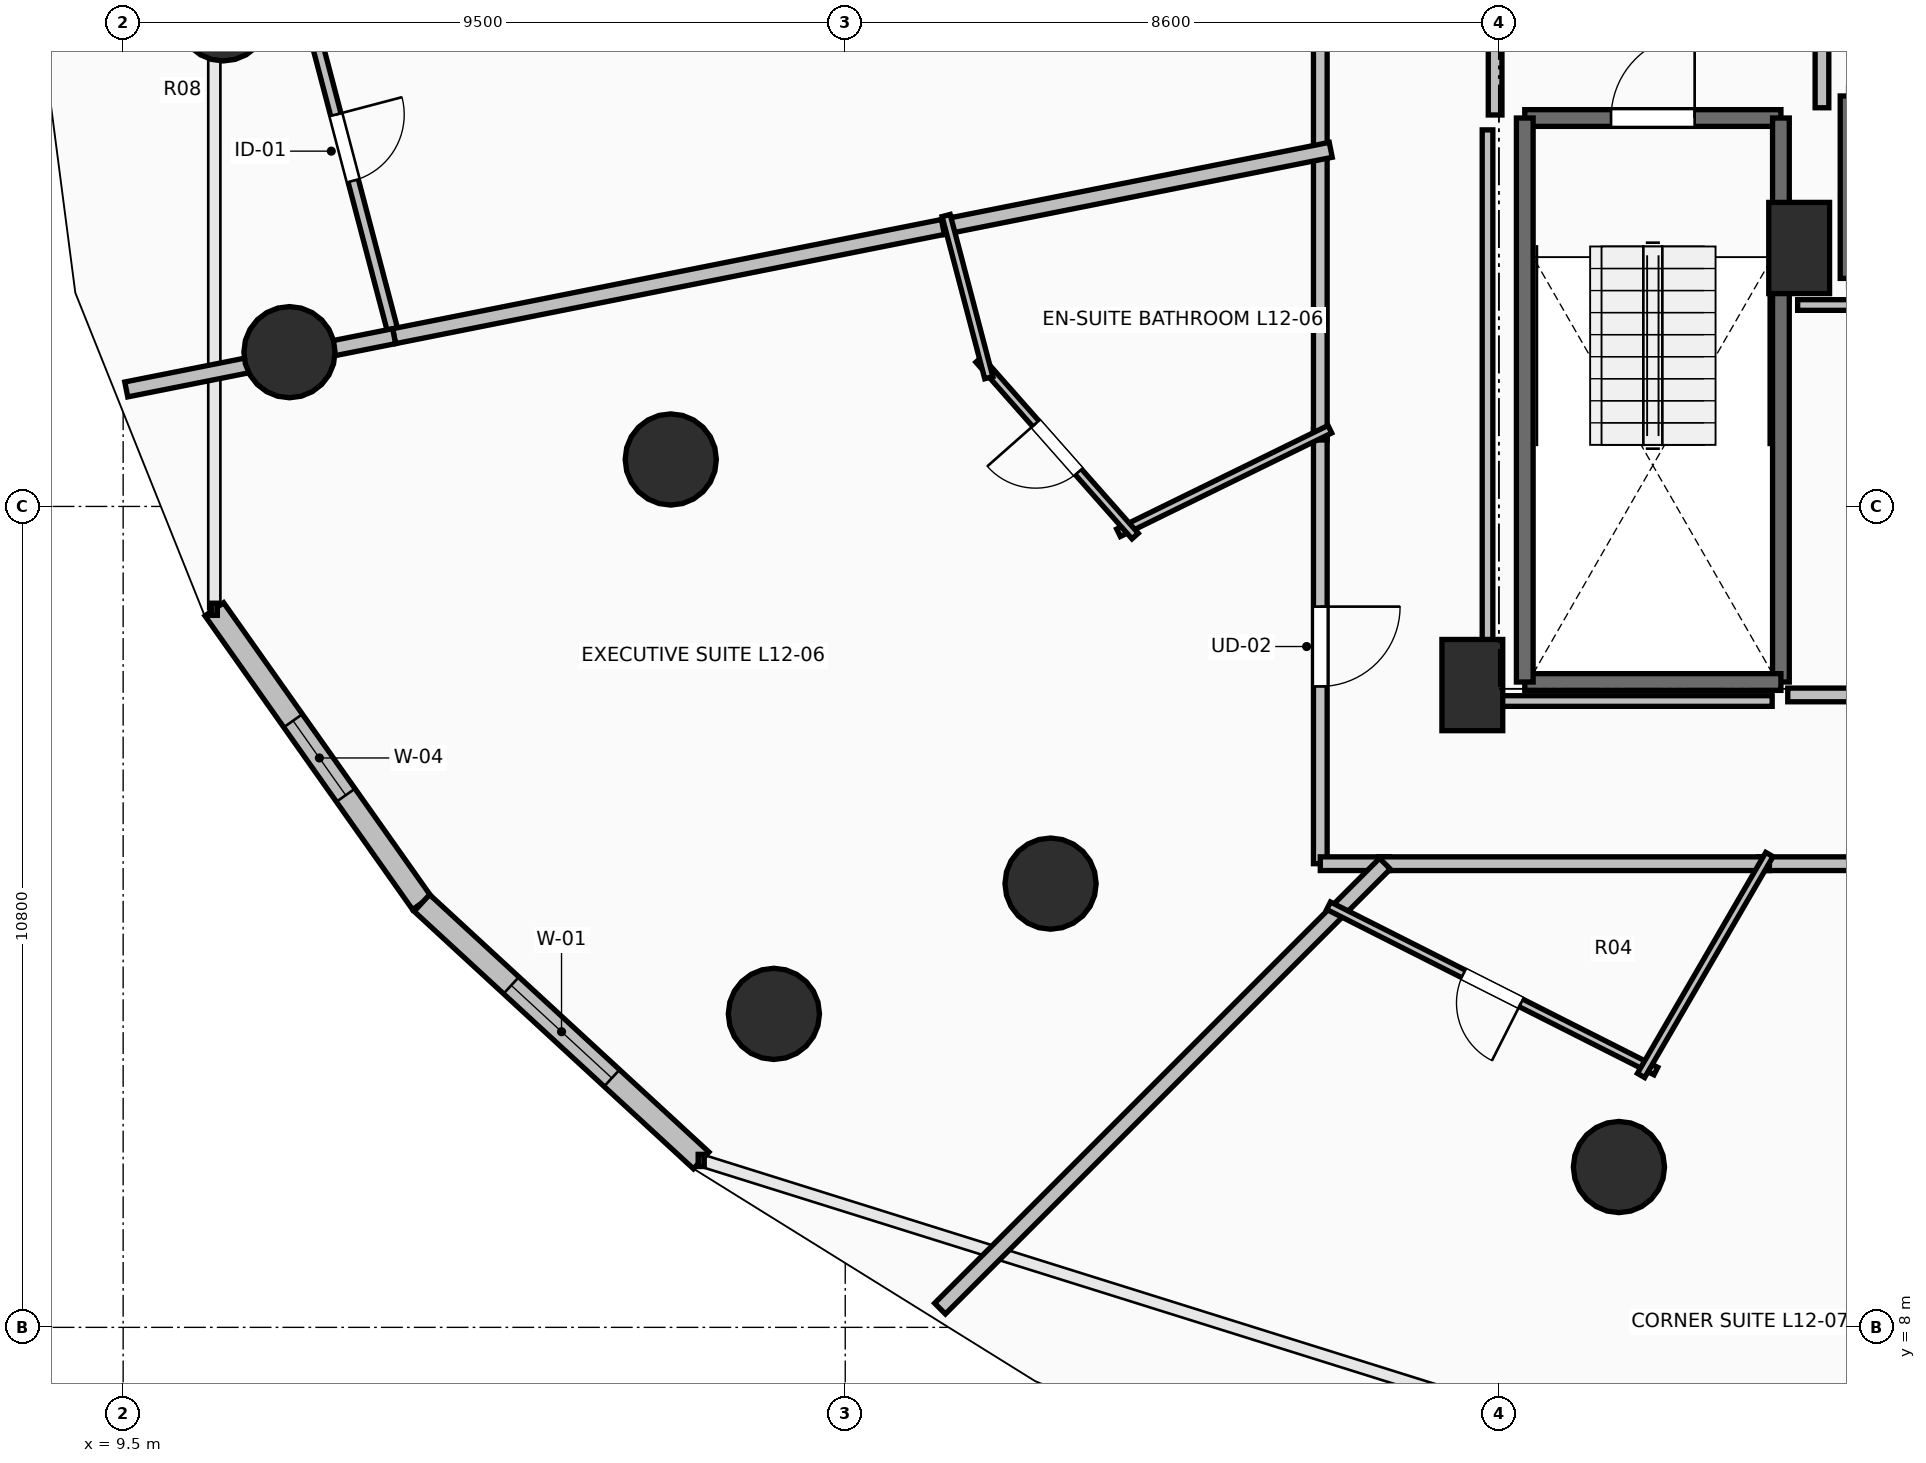
"""IFC4 building model, lengths in metres.
Left out: names, types, materials, properties, quantities, classifications, styles, units other than length and angle.
Written with IfcOpenShell. Run it as: python <this file> out.ifc"""

import sys

from ifc_helpers import new_model, si_unit, direction, frame, frame_2d, origin, origin_2d, place, context, subcontext, project, spatial, rectangle, circle, extrude, element, fill, save


model = new_model("IFC4")
c1 = context("Model", 3, precision=1e-05, world=origin(), true_north=direction((0.0, 1.0)))
c2 = subcontext(c1, "Body", "Model", "MODEL_VIEW")
j1 = project(units=[si_unit("LENGTHUNIT", "METRE"), si_unit("PLANEANGLEUNIT", "RADIAN")], contexts=[c1])
p1 = place(None, origin())
s1 = spatial("IfcSite", under=j1, at=p1, CompositionType="ELEMENT")
p2 = place(p1, origin())
s2 = spatial("IfcBuilding", under=s1, at=p2, CompositionType="ELEMENT")
p3 = place(p2, frame((0.0, 0.0, 48.5)))
s3 = spatial("IfcBuildingStorey", under=s2, at=p3, CompositionType="ELEMENT", Elevation=48.5)
for number, where, z_axis, x_axis in (
    (1, (16.705, 19.418, 0.0), (0.0, 0.0, 1.0), (-0.924, -0.383, 0.0)),
    (2, (21.701, 13.838, 0.0), (0.0, 0.0, 1.0), (-0.707, -0.707, 0.0)),
    (3, (29.179, 10.109, 0.0), (0.0, 0.0, 1.0), (-0.383, -0.924, 0.0)),
    (4, (10.818, 25.261, 0.0), (0.0, 0.0, 1.0), (-1.0, 0.0, 0.0)),
    (5, (11.688, 20.83, 0.0), (0.0, 0.0, 1.0), (-0.924, -0.383, 0.0)),
    (6, (18.061, 12.124, 0.0), (0.0, 0.0, 1.0), (-0.707, -0.707, 0.0)),
):
    element("IfcColumn", number, at=place(p3, frame(where, z_axis=z_axis, x_axis=x_axis)), inside=s3, PredefinedType="COLUMN", context=c2, shape_type="SweptSolid", body=[
        extrude(circle(Radius=0.6, at=origin_2d()), origin(), (0.0, 0.0, 1.0), 3.5),
    ])
for number, where, z_axis, x_axis in (
    (7, (27.25, 16.45, 0.0), (0.0, 0.0, 1.0), (1.0, 0.0, 0.0)),
    (8, (31.55, 22.2, 0.0), (0.0, 0.0, 1.0), (1.0, 0.0, 0.0)),
):
    element("IfcColumn", number, at=place(p3, frame(where, z_axis=z_axis, x_axis=x_axis)), inside=s3, PredefinedType="PILASTER", context=c2, shape_type="SweptSolid", body=[
        extrude(rectangle(XDim=0.8, YDim=1.2, at=origin_2d()), origin(), (0.0, 0.0, 1.0), 3.5),
    ])
p4 = place(p3, frame((10.699, 17.447, 0.0), z_axis=(0.0, 0.0, 1.0), x_axis=(0.577130815624, -0.816651713803, 0.0)))
e9 = element("IfcWall", 9, at=p4, inside=s3, PredefinedType="STANDARD", context=c2, shape_type="SweptSolid", body=[
    extrude(rectangle(XDim=4.731, YDim=0.3, at=frame_2d((2.366, 0.0))), origin(), (0.0, 0.0, 1.0), 3.24),
])
p5 = place(p4, frame((1.795, 0.0, 0.85)))
e10 = element("IfcOpeningElement", 10, at=p5, cuts=e9, PredefinedType="OPENING", context=c2, shape_type="SweptSolid", body=[
    extrude(rectangle(XDim=1.2, YDim=1.95, at=frame_2d((0.6, 0.975))), frame((0.0, 0.165, 0.0), z_axis=(0.0, -1.0, 0.0), x_axis=(1.0, 0.0, 0.0)), (0.0, 0.0, 1.0), 0.33),
])
p6 = place(p3, frame((13.43, 13.583, 0.0), z_axis=(0.0, 0.0, 1.0), x_axis=(0.735342629635, -0.677695519419, 0.0)))
e11 = element("IfcWall", 11, at=p6, inside=s3, PredefinedType="STANDARD", context=c2, shape_type="SweptSolid", body=[
    extrude(rectangle(XDim=4.997, YDim=0.3, at=frame_2d((2.499, 0.0))), origin(), (0.0, 0.0, 1.0), 3.24),
])
p7 = place(p6, frame((1.599, 0.0, 0.85)))
e12 = element("IfcOpeningElement", 12, at=p7, cuts=e11, PredefinedType="OPENING", context=c2, shape_type="SweptSolid", body=[
    extrude(rectangle(XDim=1.8, YDim=2.19, at=frame_2d((0.9, 1.095))), frame((0.0, 0.165, 0.0), z_axis=(0.0, -1.0, 0.0), x_axis=(1.0, 0.0, 0.0)), (0.0, 0.0, 1.0), 0.33),
])
p8 = place(p3, frame((27.94, 23.91, 0.0), z_axis=(0.0, 0.0, 1.0), x_axis=(1.0, 0.0, 0.0)))
e13 = element("IfcWall", 13, at=p8, inside=s3, PredefinedType="SOLIDWALL", context=c2, shape_type="SweptSolid", body=[
    extrude(rectangle(XDim=3.37, YDim=0.22, at=frame_2d((1.685, 0.0))), origin(), (0.0, 0.0, 1.0), 3.24),
])
p9 = place(p8, frame((1.135, 0.0, 0.0)))
e14 = element("IfcOpeningElement", 14, at=p9, cuts=e13, PredefinedType="OPENING", context=c2, shape_type="SweptSolid", body=[
    extrude(rectangle(XDim=1.1, YDim=2.15, at=frame_2d((0.55, 1.075))), frame((0.0, 0.125, 0.0), z_axis=(0.0, -1.0, 0.0), x_axis=(1.0, 0.0, 0.0)), (0.0, 0.0, 1.0), 0.25),
])
p10 = place(p3, frame((31.31, 23.91, 0.0), z_axis=(0.0, 0.0, 1.0), x_axis=(0.0, -1.0, 0.0)))
e15 = element("IfcWall", 15, at=p10, inside=s3, PredefinedType="SOLIDWALL", context=c2, shape_type="SweptSolid", body=[
    extrude(rectangle(XDim=7.42, YDim=0.22, at=frame_2d((3.71, 0.0))), origin(), (0.0, 0.0, 1.0), 3.24),
])
p11 = place(p3, frame((31.31, 16.49, 0.0), z_axis=(0.0, 0.0, 1.0), x_axis=(-1.0, 0.0, 0.0)))
e16 = element("IfcWall", 16, at=p11, inside=s3, PredefinedType="SOLIDWALL", context=c2, shape_type="SweptSolid", body=[
    extrude(rectangle(XDim=3.37, YDim=0.22, at=frame_2d((1.685, 0.0))), origin(), (0.0, 0.0, 1.0), 3.24),
])
p12 = place(p3, frame((27.94, 16.49, 0.0), z_axis=(0.0, 0.0, 1.0), x_axis=(0.0, 1.0, 0.0)))
e17 = element("IfcWall", 17, at=p12, inside=s3, PredefinedType="SOLIDWALL", context=c2, shape_type="SweptSolid", body=[
    extrude(rectangle(XDim=7.42, YDim=0.22, at=frame_2d((3.71, 0.0))), origin(), (0.0, 0.0, 1.0), 3.24),
])
p13 = place(p3, frame((32.2, 24.2, 0.0), z_axis=(0.0, 0.0, 1.0), x_axis=(0.0, -1.0, 0.0)))
e18 = element("IfcWall", 18, at=p13, inside=s3, PredefinedType="SOLIDWALL", context=c2, shape_type="SweptSolid", body=[
    extrude(rectangle(XDim=2.4, YDim=0.22, at=frame_2d((1.2, 0.0))), origin(), (0.0, 0.0, 1.0), 3.24),
])
p14 = place(p3, frame((31.85, 24.045, 0.0), z_axis=(0.0, 0.0, 1.0), x_axis=(0.0, 1.0, 0.0)))
e19 = element("IfcWall", 19, at=p14, inside=s3, PredefinedType="PARTITIONING", context=c2, shape_type="SweptSolid", body=[
    extrude(rectangle(XDim=3.91, YDim=0.18, at=frame_2d((1.955, 0.0))), origin(), (0.0, 0.0, 1.0), 3.24),
])
p15 = place(p14, frame((1.355, 0.0, 0.0)))
e20 = element("IfcOpeningElement", 20, at=p15, cuts=e19, PredefinedType="OPENING", context=c2, shape_type="SweptSolid", body=[
    extrude(rectangle(XDim=1.2, YDim=2.15, at=frame_2d((0.6, 1.075))), frame((0.0, 0.105, 0.0), z_axis=(0.0, -1.0, 0.0), x_axis=(1.0, 0.0, 0.0)), (0.0, 0.0, 1.0), 0.21),
])
p16 = place(p3, frame((27.55, 28.0, 0.0), z_axis=(0.0, 0.0, 1.0), x_axis=(0.0, -1.0, 0.0)))
e21 = element("IfcWall", 21, at=p16, inside=s3, PredefinedType="PARTITIONING", context=c2, shape_type="SweptSolid", body=[
    extrude(rectangle(XDim=4.05, YDim=0.18, at=frame_2d((2.025, 0.0))), origin(), (0.0, 0.0, 1.0), 3.24),
])
p17 = place(p16, frame((1.425, 0.0, 0.0)))
e22 = element("IfcOpeningElement", 22, at=p17, cuts=e21, PredefinedType="OPENING", context=c2, shape_type="SweptSolid", body=[
    extrude(rectangle(XDim=1.2, YDim=2.15, at=frame_2d((0.6, 1.075))), frame((0.0, 0.105, 0.0), z_axis=(0.0, -1.0, 0.0), x_axis=(1.0, 0.0, 0.0)), (0.0, 0.0, 1.0), 0.21),
])
p18 = place(p3, frame((31.4, 16.32, 0.0), z_axis=(0.0, 0.0, 1.0), x_axis=(1.0, 0.0, 0.0)))
e23 = element("IfcWall", 23, at=p18, inside=s3, PredefinedType="PARTITIONING", context=c2, shape_type="SweptSolid", body=[
    extrude(rectangle(XDim=4.4, YDim=0.18, at=frame_2d((2.2, 0.0))), origin(), (0.0, 0.0, 1.0), 3.24),
])
p19 = place(p18, frame((1.775, 0.0, 0.0)))
e24 = element("IfcOpeningElement", 24, at=p19, cuts=e23, PredefinedType="OPENING", context=c2, shape_type="SweptSolid", body=[
    extrude(rectangle(XDim=0.85, YDim=2.1, at=frame_2d((0.425, 1.05))), frame((0.0, 0.105, 0.0), z_axis=(0.0, -1.0, 0.0), x_axis=(1.0, 0.0, 0.0)), (0.0, 0.0, 1.0), 0.21),
])
p20 = place(p3, frame((25.25, 27.774, 0.0), z_axis=(0.0, 0.0, 1.0), x_axis=(0.0, -1.0, 0.0)))
e25 = element("IfcWall", 25, at=p20, inside=s3, PredefinedType="PARTITIONING", context=c2, shape_type="SweptSolid", body=[
    extrude(rectangle(XDim=4.371, YDim=0.18, at=frame_2d((2.186, 0.0))), origin(), (0.0, 0.0, 1.0), 2.432),
])
p21 = place(p20, frame((1.66, 0.0, 0.0)))
e26 = element("IfcOpeningElement", 26, at=p21, cuts=e25, PredefinedType="OPENING", context=c2, shape_type="SweptSolid", body=[
    extrude(rectangle(XDim=1.05, YDim=2.2, at=frame_2d((0.525, 1.1))), frame((0.0, 0.105, 0.0), z_axis=(0.0, -1.0, 0.0), x_axis=(1.0, 0.0, 0.0)), (0.0, 0.0, 1.0), 0.21),
])
p22 = place(p3, frame((25.25, 19.814, 0.0), z_axis=(0.0, 0.0, 1.0), x_axis=(0.0, -1.0, 0.0)))
e27 = element("IfcWall", 27, at=p22, inside=s3, PredefinedType="PARTITIONING", context=c2, shape_type="SweptSolid", body=[
    extrude(rectangle(XDim=5.714, YDim=0.18, at=frame_2d((2.857, 0.0))), origin(), (0.0, 0.0, 1.0), 2.432),
])
p23 = place(p22, frame((2.332, 0.0, 0.0)))
e28 = element("IfcOpeningElement", 28, at=p23, cuts=e27, PredefinedType="OPENING", context=c2, shape_type="SweptSolid", body=[
    extrude(rectangle(XDim=1.05, YDim=2.2, at=frame_2d((0.525, 1.1))), frame((0.0, 0.105, 0.0), z_axis=(0.0, -1.0, 0.0), x_axis=(1.0, 0.0, 0.0)), (0.0, 0.0, 1.0), 0.21),
])
p24 = place(p3, frame((25.25, 14.1, 0.0), z_axis=(0.0, 0.0, 1.0), x_axis=(1.0, 0.0, 0.0)))
e29 = element("IfcWall", 29, at=p24, inside=s3, PredefinedType="PARTITIONING", context=c2, shape_type="SweptSolid", body=[
    extrude(rectangle(XDim=0.91, YDim=0.18, at=frame_2d((0.455, 0.0))), origin(), (0.0, 0.0, 1.0), 2.886),
])
p25 = place(p3, frame((25.25, 23.543, 0.0), z_axis=(0.0, 0.0, 1.0), x_axis=(0.0, -1.0, 0.0)))
e30 = element("IfcWall", 30, at=p25, inside=s3, PredefinedType="PARTITIONING", context=c2, shape_type="SweptSolid", body=[
    extrude(rectangle(XDim=3.869, YDim=0.18, at=frame_2d((1.935, 0.0))), origin(), (0.0, 0.0, 1.0), 3.24),
])
p26 = place(p3, frame((31.019, 14.1, 0.0), z_axis=(0.0, 0.0, 1.0), x_axis=(1.0, 0.0, 0.0)))
e31 = element("IfcWall", 31, at=p26, inside=s3, PredefinedType="PARTITIONING", context=c2, shape_type="SweptSolid", body=[
    extrude(rectangle(XDim=4.674, YDim=0.18, at=frame_2d((2.337, 0.0))), origin(), (0.0, 0.0, 1.0), 3.24),
])
p27 = place(p26, frame((1.812, 0.0, 0.0)))
e32 = element("IfcOpeningElement", 32, at=p27, cuts=e31, PredefinedType="OPENING", context=c2, shape_type="SweptSolid", body=[
    extrude(rectangle(XDim=1.05, YDim=2.2, at=frame_2d((0.525, 1.1))), frame((0.0, 0.105, 0.0), z_axis=(0.0, -1.0, 0.0), x_axis=(1.0, 0.0, 0.0)), (0.0, 0.0, 1.0), 0.21),
])
p28 = place(p3, frame((26.02, 14.1, 0.0), z_axis=(0.0, 0.0, 1.0), x_axis=(1.0, 0.0, 0.0)))
e33 = element("IfcWall", 33, at=p28, inside=s3, PredefinedType="PARTITIONING", context=c2, shape_type="SweptSolid", body=[
    extrude(rectangle(XDim=5.139, YDim=0.18, at=frame_2d((2.569, 0.0))), origin(), (0.0, 0.0, 1.0), 2.432),
])
p29 = place(p3, frame((11.76, 26.0, 0.0), z_axis=(0.0, 0.0, 1.0), x_axis=(0.254434720755, -0.967089950767, 0.0)))
e34 = element("IfcWall", 34, at=p29, inside=s3, PredefinedType="PARTITIONING", context=c2, shape_type="SweptSolid", body=[
    extrude(rectangle(XDim=5.129, YDim=0.14, at=frame_2d((2.564, 0.0))), origin(), (0.0, 0.0, 1.0), 2.432),
])
p30 = place(p29, frame((2.115, 0.0, 0.0)))
e35 = element("IfcOpeningElement", 35, at=p30, cuts=e34, PredefinedType="OPENING", context=c2, shape_type="SweptSolid", body=[
    extrude(rectangle(XDim=0.9, YDim=2.1, at=frame_2d((0.45, 1.05))), frame((0.0, 0.085, 0.0), z_axis=(0.0, -1.0, 0.0), x_axis=(1.0, 0.0, 0.0)), (0.0, 0.0, 1.0), 0.17),
])
p31 = place(p3, frame((13.065, 21.04, 0.0), z_axis=(0.0, 0.0, 1.0), x_axis=(0.980774220135, 0.195145917502, 0.0)))
e36 = element("IfcWall", 36, at=p31, inside=s3, PredefinedType="PARTITIONING", context=c2, shape_type="SweptSolid", body=[
    extrude(rectangle(XDim=7.501, YDim=0.2, at=frame_2d((3.751, 0.0))), origin(), (0.0, 0.0, 1.0), 2.972),
])
p32 = place(p3, frame((20.285, 22.476, 0.0), z_axis=(0.0, 0.0, 1.0), x_axis=(0.980785905074, 0.195087181559, 0.0)))
e37 = element("IfcWall", 37, at=p32, inside=s3, PredefinedType="PARTITIONING", context=c2, shape_type="SweptSolid", body=[
    extrude(rectangle(XDim=5.202, YDim=0.2, at=frame_2d((2.601, 0.0))), origin(), (0.0, 0.0, 1.0), 2.886),
])
p33 = place(p3, frame((9.541, 20.339, 0.0), z_axis=(0.0, 0.0, 1.0), x_axis=(0.980786594985, 0.195083713053, 0.0)))
e38 = element("IfcWall", 38, at=p33, inside=s3, PredefinedType="PARTITIONING", context=c2, shape_type="SweptSolid", body=[
    extrude(rectangle(XDim=3.593, YDim=0.2, at=frame_2d((1.796, 0.0))), origin(), (0.0, 0.0, 1.0), 2.432),
])
p34 = place(p3, frame((25.376, 19.816, 0.0), z_axis=(0.0, 0.0, 1.0), x_axis=(-0.89800930559, -0.439976461954, 0.0)))
e39 = element("IfcWall", 39, at=p34, inside=s3, PredefinedType="PARTITIONING", context=c2, shape_type="SweptSolid", body=[
    extrude(rectangle(XDim=3.096, YDim=0.11, at=frame_2d((1.548, 0.0))), origin(), (0.0, 0.0, 1.0), 3.24),
])
p35 = place(p3, frame((22.814, 18.41, 0.0), z_axis=(0.0, 0.0, 1.0), x_axis=(-0.662186487972, 0.749339078887, 0.0)))
e40 = element("IfcWall", 40, at=p35, inside=s3, PredefinedType="PARTITIONING", context=c2, shape_type="SweptSolid", body=[
    extrude(rectangle(XDim=3.101, YDim=0.11, at=frame_2d((1.551, 0.0))), origin(), (0.0, 0.0, 1.0), 2.886),
])
p36 = place(p35, frame((1.125, 0.0, 0.0)))
e41 = element("IfcOpeningElement", 41, at=p36, cuts=e40, PredefinedType="OPENING", context=c2, shape_type="SweptSolid", body=[
    extrude(rectangle(XDim=0.85, YDim=2.1, at=frame_2d((0.425, 1.05))), frame((0.0, 0.07, 0.0), z_axis=(0.0, -1.0, 0.0), x_axis=(1.0, 0.0, 0.0)), (0.0, 0.0, 1.0), 0.14),
])
p37 = place(p3, frame((20.889, 20.494, 0.0), z_axis=(0.0, 0.0, 1.0), x_axis=(-0.254389812051, 0.967101764823, 0.0)))
e42 = element("IfcWall", 42, at=p37, inside=s3, PredefinedType="PARTITIONING", context=c2, shape_type="SweptSolid", body=[
    extrude(rectangle(XDim=2.206, YDim=0.11, at=frame_2d((1.103, 0.0))), origin(), (0.0, 0.0, 1.0), 3.24),
])
p38 = place(p3, frame((20.247, 8.247, 0.0), z_axis=(0.0, 0.0, 1.0), x_axis=(0.707106781187, 0.707106781187, 0.0)))
e43 = element("IfcWall", 43, at=p38, inside=s3, PredefinedType="PARTITIONING", context=c2, shape_type="SweptSolid", body=[
    extrude(rectangle(XDim=8.277, YDim=0.2, at=frame_2d((4.139, 0.0))), origin(), (0.0, 0.0, 1.0), 2.624),
])
p39 = place(p3, frame((29.665, 11.372, 0.0), z_axis=(0.0, 0.0, 1.0), x_axis=(-0.892577568201, 0.450893873039, 0.0)))
e44 = element("IfcWall", 44, at=p39, inside=s3, PredefinedType="PARTITIONING", context=c2, shape_type="SweptSolid", body=[
    extrude(rectangle(XDim=4.824, YDim=0.11, at=frame_2d((2.412, 0.0))), origin(), (0.0, 0.0, 1.0), 2.432),
])
p40 = place(p39, frame((1.987, 0.0, 0.0)))
e45 = element("IfcOpeningElement", 45, at=p40, cuts=e44, PredefinedType="OPENING", context=c2, shape_type="SweptSolid", body=[
    extrude(rectangle(XDim=0.85, YDim=2.1, at=frame_2d((0.425, 1.05))), frame((0.0, 0.07, 0.0), z_axis=(0.0, -1.0, 0.0), x_axis=(1.0, 0.0, 0.0)), (0.0, 0.0, 1.0), 0.14),
])
p41 = place(p3, frame((31.158, 14.221, 0.0), z_axis=(0.0, 0.0, 1.0), x_axis=(-0.50222661214, -0.864736046466, 0.0)))
e46 = element("IfcWall", 46, at=p41, inside=s3, PredefinedType="PARTITIONING", context=c2, shape_type="SweptSolid", body=[
    extrude(rectangle(XDim=3.362, YDim=0.11, at=frame_2d((1.681, 0.0))), origin(), (0.0, 0.0, 1.0), 2.886),
])
p42 = place(p3, frame((35.58, 21.45, 0.0), z_axis=(0.0, 0.0, 1.0), x_axis=(-1.0, 0.0, 0.0)))
e47 = element("IfcWall", 47, at=p42, inside=s3, PredefinedType="PARTITIONING", context=c2, shape_type="SweptSolid", body=[
    extrude(rectangle(XDim=4.05, YDim=0.14, at=frame_2d((2.025, 0.0))), origin(), (0.0, 0.0, 1.0), 3.24),
])
p43 = place(p3, frame((31.195, 16.24, 0.0), z_axis=(0.0, 0.0, 1.0), x_axis=(-1.0, 0.0, 0.0)))
e48 = element("IfcWall", 48, at=p43, inside=s3, PredefinedType="PARTITIONING", context=c2, shape_type="SweptSolid", body=[
    extrude(rectangle(XDim=3.745, YDim=0.14, at=frame_2d((1.873, 0.0))), origin(), (0.0, 0.0, 1.0), 2.432),
])
p44 = place(p3, frame((27.45, 16.24, 0.0), z_axis=(0.0, 0.0, 1.0), x_axis=(0.0, 1.0, 0.0)))
e49 = element("IfcWall", 49, at=p44, inside=s3, PredefinedType="PARTITIONING", context=c2, shape_type="SweptSolid", body=[
    extrude(rectangle(XDim=7.514, YDim=0.14, at=frame_2d((3.757, 0.0))), origin(), (0.0, 0.0, 1.0), 2.432),
])
p45 = place(p5, origin())
e50 = element("IfcWindow", 50, at=p45, inside=s3, PartitioningType="SINGLE_PANEL", PredefinedType="WINDOW", context=c2, shape_type="SweptSolid", body=[
    extrude(rectangle(XDim=1.2, YDim=1.95, at=frame_2d((0.6, 0.975))), frame((0.0, 0.03, 0.0), z_axis=(0.0, -1.0, 0.0), x_axis=(1.0, 0.0, 0.0)), (0.0, 0.0, 1.0), 0.06),
])
fill(e10, e50)
p46 = place(p7, origin())
e51 = element("IfcWindow", 51, at=p46, inside=s3, PartitioningType="SINGLE_PANEL", PredefinedType="WINDOW", context=c2, shape_type="SweptSolid", body=[
    extrude(rectangle(XDim=1.8, YDim=2.19, at=frame_2d((0.9, 1.095))), frame((0.0, 0.03, 0.0), z_axis=(0.0, -1.0, 0.0), x_axis=(1.0, 0.0, 0.0)), (0.0, 0.0, 1.0), 0.06),
])
fill(e12, e51)
p47 = place(p9, origin())
e52 = element("IfcDoor", 52, at=p47, inside=s3, OperationType="SINGLE_SWING_RIGHT", PredefinedType="DOOR", context=c2, shape_type="SweptSolid", body=[
    extrude(rectangle(XDim=1.1, YDim=2.15, at=frame_2d((0.55, 1.075))), frame((0.0, 0.025, 0.0), z_axis=(0.0, -1.0, 0.0), x_axis=(1.0, 0.0, 0.0)), (0.0, 0.0, 1.0), 0.05),
])
fill(e14, e52)
p48 = place(p23, origin())
e53 = element("IfcDoor", 53, at=p48, inside=s3, OperationType="SINGLE_SWING_LEFT", PredefinedType="DOOR", context=c2, shape_type="SweptSolid", body=[
    extrude(rectangle(XDim=1.05, YDim=2.2, at=frame_2d((0.525, 1.1))), frame((0.0, 0.025, 0.0), z_axis=(0.0, -1.0, 0.0), x_axis=(1.0, 0.0, 0.0)), (0.0, 0.0, 1.0), 0.05),
])
fill(e28, e53)
p49 = place(p30, origin())
e54 = element("IfcDoor", 54, at=p49, inside=s3, OperationType="SINGLE_SWING_LEFT", PredefinedType="DOOR", context=c2, shape_type="SweptSolid", body=[
    extrude(rectangle(XDim=0.9, YDim=2.1, at=frame_2d((0.45, 1.05))), frame((0.0, 0.025, 0.0), z_axis=(0.0, -1.0, 0.0), x_axis=(1.0, 0.0, 0.0)), (0.0, 0.0, 1.0), 0.05),
])
fill(e35, e54)
p50 = place(p36, origin())
e55 = element("IfcDoor", 55, at=p50, inside=s3, OperationType="SINGLE_SWING_RIGHT", PredefinedType="DOOR", context=c2, shape_type="SweptSolid", body=[
    extrude(rectangle(XDim=0.85, YDim=2.1, at=frame_2d((0.425, 1.05))), frame((0.0, 0.025, 0.0), z_axis=(0.0, -1.0, 0.0), x_axis=(1.0, 0.0, 0.0)), (0.0, 0.0, 1.0), 0.05),
])
fill(e41, e55)
p51 = place(p40, origin())
e56 = element("IfcDoor", 56, at=p51, inside=s3, OperationType="SINGLE_SWING_LEFT", PredefinedType="DOOR", context=c2, shape_type="SweptSolid", body=[
    extrude(rectangle(XDim=0.85, YDim=2.1, at=frame_2d((0.425, 1.05))), frame((0.0, 0.025, 0.0), z_axis=(0.0, -1.0, 0.0), x_axis=(1.0, 0.0, 0.0)), (0.0, 0.0, 1.0), 0.05),
])
fill(e45, e56)
save(model, sys.argv[1])
